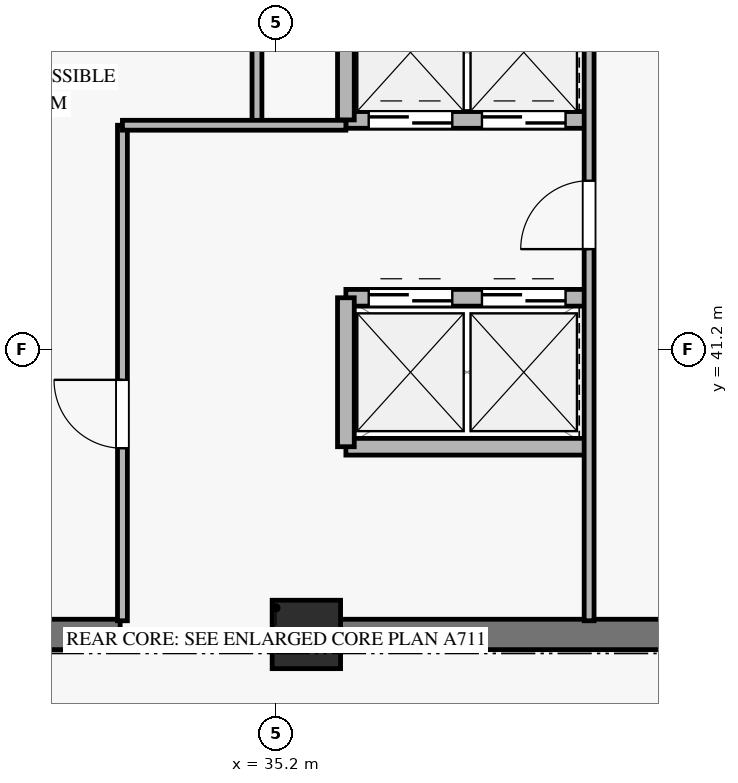
"""IFC4 building model, lengths in metres.
Left out: names, types, materials, properties, quantities, classifications, styles, units other than length and angle.
Written with IfcOpenShell. Run it as: python <this file> out.ifc"""

import sys

from ifc_helpers import new_model, si_unit, direction, frame, frame_2d, origin, origin_2d, place, context, subcontext, project, spatial, rectangle, extrude, source, transform, mapped, element, fill, save


model = new_model("IFC4")
c1 = context("Model", 3, precision=1e-05, world=origin(), true_north=direction((0.0, 1.0)))
c2 = subcontext(c1, "Body", "Model", "MODEL_VIEW")
j1 = project(units=[si_unit("LENGTHUNIT", "METRE"), si_unit("PLANEANGLEUNIT", "RADIAN")], contexts=[c1])
p1 = place(None, origin())
s1 = spatial("IfcSite", under=j1, at=p1, CompositionType="ELEMENT")
p2 = place(p1, origin())
s2 = spatial("IfcBuilding", under=s1, at=p2, CompositionType="ELEMENT")
p3 = place(p2, frame((0.0, 0.0, 307.4)))
s3 = spatial("IfcBuildingStorey", under=s2, at=p3, CompositionType="ELEMENT", Elevation=307.4)
m1 = source(origin(), c2, "Body", "SweptSolid", [
    extrude(rectangle(XDim=0.9, YDim=0.9, at=origin_2d()), origin(), (0.0, 0.0, 1.0), 3.185),
])
p4 = place(p3, frame((35.6, 37.45, 0.0), z_axis=(0.0, 0.0, 1.0), x_axis=(1.0, 0.0, 0.0)))
e1 = element("IfcColumn", 1, at=p4, inside=s3, PredefinedType="PILASTER", context=c2, shape_type="MappedRepresentation", body=[
    mapped(m1, transform((0.0, 0.0, 0.0), x_axis=(1.0, 0.0, 0.0), y_axis=(0.0, 1.0, 0.0), z_axis=(0.0, 0.0, 1.0), scale=1.0)),
])
p5 = place(p3, frame((31.25, 37.45, 0.0), z_axis=(0.0, 0.0, 1.0), x_axis=(1.0, 0.0, 0.0)))
e2 = element("IfcWall", 2, at=p5, inside=s3, PredefinedType="SHEAR", context=c2, shape_type="SweptSolid", body=[
    extrude(rectangle(XDim=1.9, YDim=0.4, at=frame_2d((0.95, 0.0))), origin(), (0.0, 0.0, 1.0), 3.185),
])
p6 = place(p3, frame((36.05, 37.45, 0.0), z_axis=(0.0, 0.0, 1.0), x_axis=(1.0, 0.0, 0.0)))
e3 = element("IfcWall", 3, at=p6, inside=s3, PredefinedType="SHEAR", context=c2, shape_type="SweptSolid", body=[
    extrude(rectangle(XDim=7.8, YDim=0.4, at=frame_2d((3.9, 0.0))), origin(), (0.0, 0.0, 1.0), 3.185),
])
p7 = place(p3, frame((36.12, 44.22, 0.0), z_axis=(0.0, 0.0, 1.0), x_axis=(1.0, 0.0, 0.0)))
e4 = element("IfcWall", 4, at=p7, inside=s3, PredefinedType="SOLIDWALL", context=c2, shape_type="SweptSolid", body=[
    extrude(rectangle(XDim=3.2, YDim=0.22, at=frame_2d((1.6, 0.0))), origin(), (0.0, 0.0, 1.0), 3.185),
])
p8 = place(p7, frame((0.3, 0.0, 0.0)))
e5 = element("IfcOpeningElement", 5, at=p8, cuts=e4, PredefinedType="OPENING", context=c2, shape_type="SweptSolid", body=[
    extrude(rectangle(XDim=1.1, YDim=2.2, at=frame_2d((0.55, 1.1))), frame((0.0, 0.12, 0.0), z_axis=(0.0, -1.0, 0.0), x_axis=(1.0, 0.0, 0.0)), (0.0, 0.0, 1.0), 0.24),
])
p9 = place(p7, frame((1.79, 0.0, 0.0)))
e6 = element("IfcOpeningElement", 6, at=p9, cuts=e4, PredefinedType="OPENING", context=c2, shape_type="SweptSolid", body=[
    extrude(rectangle(XDim=1.1, YDim=2.2, at=frame_2d((0.55, 1.1))), frame((0.0, 0.12, 0.0), z_axis=(0.0, -1.0, 0.0), x_axis=(1.0, 0.0, 0.0)), (0.0, 0.0, 1.0), 0.24),
])
p10 = place(p3, frame((36.12, 41.88, 0.0), z_axis=(0.0, 0.0, 1.0), x_axis=(1.0, 0.0, 0.0)))
e7 = element("IfcWall", 7, at=p10, inside=s3, PredefinedType="SOLIDWALL", context=c2, shape_type="SweptSolid", body=[
    extrude(rectangle(XDim=3.2, YDim=0.22, at=frame_2d((1.6, 0.0))), origin(), (0.0, 0.0, 1.0), 3.185),
])
p11 = place(p10, frame((0.3, 0.0, 0.0)))
e8 = element("IfcOpeningElement", 8, at=p11, cuts=e7, PredefinedType="OPENING", context=c2, shape_type="SweptSolid", body=[
    extrude(rectangle(XDim=1.1, YDim=2.2, at=frame_2d((0.55, 1.1))), frame((0.0, 0.12, 0.0), z_axis=(0.0, -1.0, 0.0), x_axis=(1.0, 0.0, 0.0)), (0.0, 0.0, 1.0), 0.24),
])
p12 = place(p10, frame((1.79, 0.0, 0.0)))
e9 = element("IfcOpeningElement", 9, at=p12, cuts=e7, PredefinedType="OPENING", context=c2, shape_type="SweptSolid", body=[
    extrude(rectangle(XDim=1.1, YDim=2.2, at=frame_2d((0.55, 1.1))), frame((0.0, 0.12, 0.0), z_axis=(0.0, -1.0, 0.0), x_axis=(1.0, 0.0, 0.0)), (0.0, 0.0, 1.0), 0.24),
])
p13 = place(p3, frame((36.12, 39.92, 0.0), z_axis=(0.0, 0.0, 1.0), x_axis=(1.0, 0.0, 0.0)))
e10 = element("IfcWall", 10, at=p13, inside=s3, PredefinedType="SOLIDWALL", context=c2, shape_type="SweptSolid", body=[
    extrude(rectangle(XDim=3.2, YDim=0.22, at=frame_2d((1.6, 0.0))), origin(), (0.0, 0.0, 1.0), 3.185),
])
p14 = place(p3, frame((36.12, 39.92, 0.0), z_axis=(0.0, 0.0, 1.0), x_axis=(0.0, 1.0, 0.0)))
e11 = element("IfcWall", 11, at=p14, inside=s3, PredefinedType="SOLIDWALL", context=c2, shape_type="SweptSolid", body=[
    extrude(rectangle(XDim=1.96, YDim=0.22, at=frame_2d((0.98, 0.0))), origin(), (0.0, 0.0, 1.0), 3.185),
])
p15 = place(p3, frame((36.12, 44.22, 0.0), z_axis=(0.0, 0.0, 1.0), x_axis=(0.0, 1.0, 0.0)))
e12 = element("IfcWall", 12, at=p15, inside=s3, PredefinedType="SOLIDWALL", context=c2, shape_type="SweptSolid", body=[
    extrude(rectangle(XDim=2.15, YDim=0.22, at=frame_2d((1.075, 0.0))), origin(), (0.0, 0.0, 1.0), 3.185),
])
p16 = place(p3, frame((33.18, 37.63, 0.0), z_axis=(0.0, 0.0, 1.0), x_axis=(0.0, 1.0, 0.0)))
e13 = element("IfcWall", 13, at=p16, inside=s3, PredefinedType="PARTITIONING", context=c2, shape_type="SweptSolid", body=[
    extrude(rectangle(XDim=6.52, YDim=0.13, at=frame_2d((3.26, 0.0))), origin(), (0.0, 0.0, 1.0), 2.27),
])
p17 = place(p16, frame((2.27, 0.0, 0.0)))
e14 = element("IfcOpeningElement", 14, at=p17, cuts=e13, PredefinedType="OPENING", context=c2, shape_type="SweptSolid", body=[
    extrude(rectangle(XDim=0.9, YDim=2.1, at=frame_2d((0.45, 1.05))), frame((0.0, 0.075, 0.0), z_axis=(0.0, -1.0, 0.0), x_axis=(1.0, 0.0, 0.0)), (0.0, 0.0, 1.0), 0.15),
])
p18 = place(p3, frame((34.95, 44.15, 0.0), z_axis=(0.0, 0.0, 1.0), x_axis=(0.0, 1.0, 0.0)))
e15 = element("IfcWall", 15, at=p18, inside=s3, PredefinedType="PARTITIONING", context=c2, shape_type="SweptSolid", body=[
    extrude(rectangle(XDim=2.22, YDim=0.13, at=frame_2d((1.11, 0.0))), origin(), (0.0, 0.0, 1.0), 3.185),
])
p19 = place(p3, frame((33.18, 44.15, 0.0), z_axis=(0.0, 0.0, 1.0), x_axis=(1.0, 0.0, 0.0)))
e16 = element("IfcWall", 16, at=p19, inside=s3, PredefinedType="PARTITIONING", context=c2, shape_type="SweptSolid", body=[
    extrude(rectangle(XDim=2.94, YDim=0.13, at=frame_2d((1.47, 0.0))), origin(), (0.0, 0.0, 1.0), 2.47),
])
p20 = place(p3, frame((39.32, 37.63, 0.0), z_axis=(0.0, 0.0, 1.0), x_axis=(0.0, 1.0, 0.0)))
e17 = element("IfcWall", 17, at=p20, inside=s3, PredefinedType="PARTITIONING", context=c2, shape_type="SweptSolid", body=[
    extrude(rectangle(XDim=8.74, YDim=0.13, at=frame_2d((4.37, 0.0))), origin(), (0.0, 0.0, 1.0), 3.185),
])
p21 = place(p20, frame((4.89, 0.0, 0.0)))
e18 = element("IfcOpeningElement", 18, at=p21, cuts=e17, PredefinedType="OPENING", context=c2, shape_type="SweptSolid", body=[
    extrude(rectangle(XDim=0.9, YDim=2.1, at=frame_2d((0.45, 1.05))), frame((0.0, 0.075, 0.0), z_axis=(0.0, -1.0, 0.0), x_axis=(1.0, 0.0, 0.0)), (0.0, 0.0, 1.0), 0.15),
])
m2 = source(origin(), c2, "Body", "SweptSolid", [
    extrude(rectangle(XDim=1.1, YDim=2.2, at=frame_2d((0.55, 1.1))), frame((0.0, 0.025, 0.0), z_axis=(0.0, -1.0, 0.0), x_axis=(1.0, 0.0, 0.0)), (0.0, 0.0, 1.0), 0.05),
])
p22 = place(p8, origin())
e19 = element("IfcDoor", 19, at=p22, inside=s3, OperationType="SLIDING_TO_LEFT", PredefinedType="DOOR", context=c2, shape_type="MappedRepresentation", body=[
    mapped(m2, transform((0.0, 0.0, 0.0), x_axis=(1.0, 0.0, 0.0), y_axis=(0.0, 1.0, 0.0), z_axis=(0.0, 0.0, 1.0), scale=1.0)),
])
fill(e5, e19)
p23 = place(p9, origin())
e20 = element("IfcDoor", 20, at=p23, inside=s3, OperationType="SLIDING_TO_LEFT", PredefinedType="DOOR", context=c2, shape_type="MappedRepresentation", body=[
    mapped(m2, transform((0.0, 0.0, 0.0), x_axis=(1.0, 0.0, 0.0), y_axis=(0.0, 1.0, 0.0), z_axis=(0.0, 0.0, 1.0), scale=1.0)),
])
fill(e6, e20)
p24 = place(p11, origin())
e21 = element("IfcDoor", 21, at=p24, inside=s3, OperationType="SLIDING_TO_LEFT", PredefinedType="DOOR", context=c2, shape_type="MappedRepresentation", body=[
    mapped(m2, transform((0.0, 0.0, 0.0), x_axis=(1.0, 0.0, 0.0), y_axis=(0.0, 1.0, 0.0), z_axis=(0.0, 0.0, 1.0), scale=1.0)),
])
fill(e8, e21)
p25 = place(p12, origin())
e22 = element("IfcDoor", 22, at=p25, inside=s3, OperationType="SLIDING_TO_LEFT", PredefinedType="DOOR", context=c2, shape_type="MappedRepresentation", body=[
    mapped(m2, transform((0.0, 0.0, 0.0), x_axis=(1.0, 0.0, 0.0), y_axis=(0.0, 1.0, 0.0), z_axis=(0.0, 0.0, 1.0), scale=1.0)),
])
fill(e9, e22)
m3 = source(origin(), c2, "Body", "SweptSolid", [
    extrude(rectangle(XDim=0.9, YDim=2.1, at=frame_2d((0.45, 1.05))), frame((0.0, 0.025, 0.0), z_axis=(0.0, -1.0, 0.0), x_axis=(1.0, 0.0, 0.0)), (0.0, 0.0, 1.0), 0.05),
])
p26 = place(p17, origin())
e23 = element("IfcDoor", 23, at=p26, inside=s3, OperationType="SINGLE_SWING_RIGHT", PredefinedType="DOOR", context=c2, shape_type="MappedRepresentation", body=[
    mapped(m3, transform((0.0, 0.0, 0.0), x_axis=(1.0, 0.0, 0.0), y_axis=(0.0, 1.0, 0.0), z_axis=(0.0, 0.0, 1.0), scale=1.0)),
])
fill(e14, e23)
p27 = place(p21, origin())
e24 = element("IfcDoor", 24, at=p27, inside=s3, OperationType="SINGLE_SWING_LEFT", PredefinedType="DOOR", context=c2, shape_type="MappedRepresentation", body=[
    mapped(m3, transform((0.0, 0.0, 0.0), x_axis=(1.0, 0.0, 0.0), y_axis=(0.0, 1.0, 0.0), z_axis=(0.0, 0.0, 1.0), scale=1.0)),
])
fill(e18, e24)
save(model, sys.argv[1])
